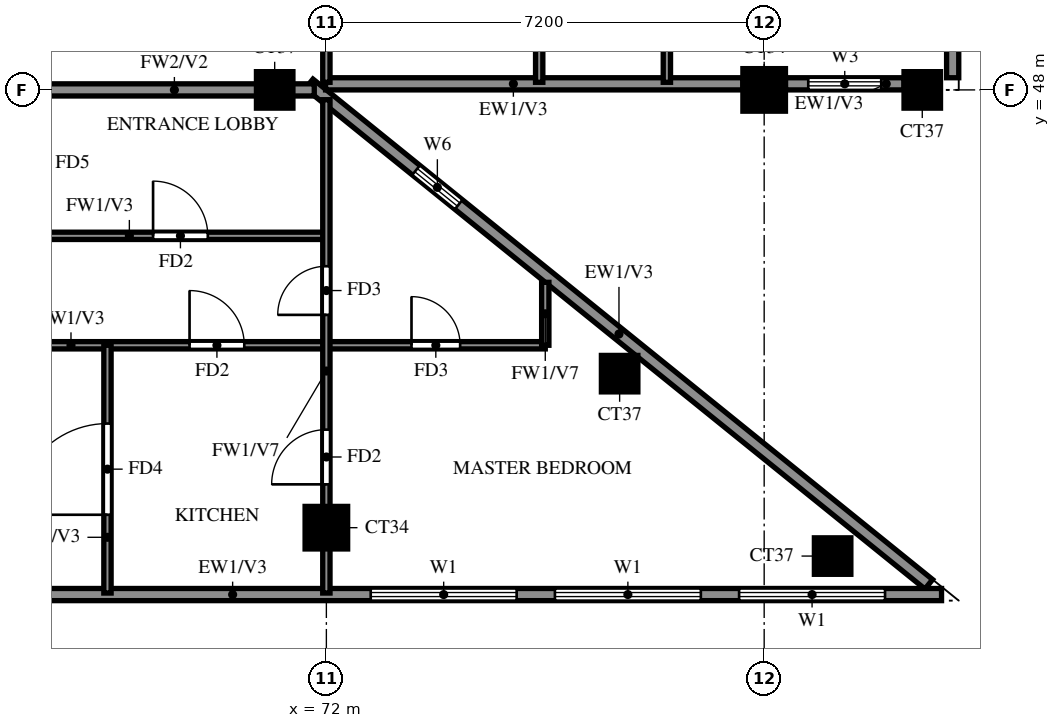
"""IFC4 building model, lengths in metres.
Left out: names, types, materials, properties, quantities, classifications, styles, units other than length and angle.
Written with IfcOpenShell. Run it as: python <this file> out.ifc"""

import sys

from ifc_helpers import new_model, si_unit, direction, frame, frame_2d, origin, origin_2d, place, context, subcontext, project, spatial, rectangle, extrude, source, transform, mapped, element, fill, save


model = new_model("IFC4")
c1 = context("Model", 3, precision=1e-05, world=origin(), true_north=direction((0.0, 1.0)))
c2 = subcontext(c1, "Body", "Model", "MODEL_VIEW")
j1 = project(units=[si_unit("LENGTHUNIT", "METRE"), si_unit("PLANEANGLEUNIT", "RADIAN")], contexts=[c1])
p1 = place(None, origin())
s1 = spatial("IfcSite", under=j1, at=p1, CompositionType="ELEMENT")
p2 = place(p1, origin())
s2 = spatial("IfcBuilding", under=s1, at=p2, CompositionType="ELEMENT")
p3 = place(p2, frame((0.0, 0.0, 260.5)))
s3 = spatial("IfcBuildingStorey", under=s2, at=p3, CompositionType="ELEMENT", Elevation=260.5)
m1 = source(origin(), c2, "Body", "SweptSolid", [
    extrude(rectangle(XDim=0.6, YDim=0.6, at=origin_2d()), origin(), (0.0, 0.0, 1.0), 3.22),
])
p4 = place(p3, frame((80.326, 40.333, 0.0), z_axis=(0.0, 0.0, 1.0), x_axis=(1.0, 0.0, 0.0)))
e1 = element("IfcColumn", 1, at=p4, inside=s3, PredefinedType="COLUMN", context=c2, shape_type="MappedRepresentation", body=[
    mapped(m1, transform((0.0, 0.0, 0.0))),
])
m2 = source(origin(), c2, "Body", "SweptSolid", [
    extrude(rectangle(XDim=0.7, YDim=0.7, at=origin_2d()), origin(), (0.0, 0.0, 1.0), 3.22),
])
p5 = place(p3, frame((72.0, 40.8, 0.0), z_axis=(0.0, 0.0, 1.0), x_axis=(1.0, 0.0, 0.0)))
e2 = element("IfcColumn", 2, at=p5, inside=s3, PredefinedType="COLUMN", context=c2, shape_type="MappedRepresentation", body=[
    mapped(m2, transform((0.0, 0.0, 0.0))),
])
for number, where, z_axis, x_axis in (
    (3, (76.823, 43.333, 0.0), (0.0, 0.0, 1.0), (1.0, 0.0, 0.0)),
    (4, (71.15, 48.0, 0.0), (0.0, 0.0, 1.0), (1.0, 0.0, 0.0)),
):
    element("IfcColumn", number, at=place(p3, frame(where, z_axis=z_axis, x_axis=x_axis)), inside=s3, PredefinedType="COLUMN", context=c2, shape_type="MappedRepresentation", body=[
        mapped(m1, transform((0.0, 0.0, 0.0))),
    ])
p6 = place(p3, frame((79.2, 48.0, 0.0), z_axis=(0.0, 0.0, 1.0), x_axis=(1.0, 0.0, 0.0)))
e5 = element("IfcColumn", 5, at=p6, inside=s3, PredefinedType="COLUMN", context=c2, shape_type="MappedRepresentation", body=[
    mapped(m2, transform((0.0, 0.0, 0.0))),
])
p7 = place(p3, frame((81.8, 48.0, 0.0), z_axis=(0.0, 0.0, 1.0), x_axis=(1.0, 0.0, 0.0)))
e6 = element("IfcColumn", 6, at=p7, inside=s3, PredefinedType="COLUMN", context=c2, shape_type="MappedRepresentation", body=[
    mapped(m1, transform((0.0, 0.0, 0.0))),
])
p8 = place(p3, frame((81.907, 39.87, 0.0), z_axis=(0.0, 0.0, 1.0), x_axis=(-0.777936274417, 0.62834318087, 0.0)))
e7 = element("IfcWall", 7, at=p8, inside=s3, PredefinedType="SOLIDWALL", context=c2, shape_type="SweptSolid", body=[
    extrude(rectangle(XDim=13.099, YDim=0.2, at=frame_2d((6.549, 0.0))), origin(), (0.0, 0.0, 1.0), 3.22),
])
p9 = place(p8, frame((9.938, 0.0, 1.5)))
e8 = element("IfcOpeningElement", 8, at=p9, cuts=e7, PredefinedType="OPENING", context=c2, shape_type="SweptSolid", body=[
    extrude(rectangle(XDim=0.9, YDim=0.9, at=frame_2d((0.45, 0.45))), frame((0.0, 0.11, 0.0), z_axis=(0.0, -1.0, 0.0), x_axis=(1.0, 0.0, 0.0)), (0.0, 0.0, 1.0), 0.22),
])
p10 = place(p3, frame((71.987, 48.1, 0.0), z_axis=(0.0, 0.0, 1.0), x_axis=(1.0, 0.0, 0.0)))
e9 = element("IfcWall", 9, at=p10, inside=s3, PredefinedType="SOLIDWALL", context=c2, shape_type="SweptSolid", body=[
    extrude(rectangle(XDim=6.863, YDim=0.2, at=frame_2d((3.432, 0.0))), origin(), (0.0, 0.0, 1.0), 3.22),
])
p11 = place(p3, frame((79.55, 48.1, 0.0), z_axis=(0.0, 0.0, 1.0), x_axis=(1.0, 0.0, 0.0)))
e10 = element("IfcWall", 10, at=p11, inside=s3, PredefinedType="SOLIDWALL", context=c2, shape_type="SweptSolid", body=[
    extrude(rectangle(XDim=1.95, YDim=0.2, at=frame_2d((0.975, 0.0))), origin(), (0.0, 0.0, 1.0), 3.22),
])
p12 = place(p11, frame((0.375, 0.0, 0.6)))
e11 = element("IfcOpeningElement", 11, at=p12, cuts=e10, PredefinedType="OPENING", context=c2, shape_type="SweptSolid", body=[
    extrude(rectangle(XDim=1.2, YDim=2.4, at=frame_2d((0.6, 1.2))), frame((0.0, 0.11, 0.0), z_axis=(0.0, -1.0, 0.0), x_axis=(1.0, 0.0, 0.0)), (0.0, 0.0, 1.0), 0.22),
])
p13 = place(p3, frame((82.3, 48.2, 0.0), z_axis=(0.0, 0.0, 1.0), x_axis=(0.0, 1.0, 0.0)))
e12 = element("IfcWall", 12, at=p13, inside=s3, PredefinedType="SOLIDWALL", context=c2, shape_type="SweptSolid", body=[
    extrude(rectangle(XDim=28.6, YDim=0.2, at=frame_2d((14.3, 0.0))), origin(), (0.0, 0.0, 1.0), 3.22),
])
p14 = place(p13, frame((7.9, 0.0, 0.0)))
e13 = element("IfcOpeningElement", 13, at=p14, cuts=e12, PredefinedType="OPENING", context=c2, shape_type="SweptSolid", body=[
    extrude(rectangle(XDim=1.8, YDim=2.4, at=frame_2d((0.9, 1.2))), frame((0.0, 0.11, 0.0), z_axis=(0.0, -1.0, 0.0), x_axis=(1.0, 0.0, 0.0)), (0.0, 0.0, 1.0), 0.22),
])
p15 = place(p13, frame((0.6, 0.0, 0.6)))
e14 = element("IfcOpeningElement", 14, at=p15, cuts=e12, PredefinedType="OPENING", context=c2, shape_type="SweptSolid", body=[
    extrude(rectangle(XDim=2.4, YDim=2.4, at=frame_2d((1.2, 1.2))), frame((0.0, 0.11, 0.0), z_axis=(0.0, -1.0, 0.0), x_axis=(1.0, 0.0, 0.0)), (0.0, 0.0, 1.0), 0.22),
])
p16 = place(p13, frame((3.55, 0.0, 0.6)))
e15 = element("IfcOpeningElement", 15, at=p16, cuts=e12, PredefinedType="OPENING", context=c2, shape_type="SweptSolid", body=[
    extrude(rectangle(XDim=0.9, YDim=2.4, at=frame_2d((0.45, 1.2))), frame((0.0, 0.11, 0.0), z_axis=(0.0, -1.0, 0.0), x_axis=(1.0, 0.0, 0.0)), (0.0, 0.0, 1.0), 0.22),
])
p17 = place(p13, frame((5.5, 0.0, 0.6)))
e16 = element("IfcOpeningElement", 16, at=p17, cuts=e12, PredefinedType="OPENING", context=c2, shape_type="SweptSolid", body=[
    extrude(rectangle(XDim=1.2, YDim=2.4, at=frame_2d((0.6, 1.2))), frame((0.0, 0.11, 0.0), z_axis=(0.0, -1.0, 0.0), x_axis=(1.0, 0.0, 0.0)), (0.0, 0.0, 1.0), 0.22),
])
p18 = place(p13, frame((10.15, 0.0, 0.6)))
e17 = element("IfcOpeningElement", 17, at=p18, cuts=e12, PredefinedType="OPENING", context=c2, shape_type="SweptSolid", body=[
    extrude(rectangle(XDim=0.9, YDim=2.4, at=frame_2d((0.45, 1.2))), frame((0.0, 0.11, 0.0), z_axis=(0.0, -1.0, 0.0), x_axis=(1.0, 0.0, 0.0)), (0.0, 0.0, 1.0), 0.22),
])
p19 = place(p13, frame((12.1, 0.0, 0.6)))
e18 = element("IfcOpeningElement", 18, at=p19, cuts=e12, PredefinedType="OPENING", context=c2, shape_type="SweptSolid", body=[
    extrude(rectangle(XDim=1.8, YDim=2.4, at=frame_2d((0.9, 1.2))), frame((0.0, 0.11, 0.0), z_axis=(0.0, -1.0, 0.0), x_axis=(1.0, 0.0, 0.0)), (0.0, 0.0, 1.0), 0.22),
])
p20 = place(p13, frame((14.8, 0.0, 0.6)))
e19 = element("IfcOpeningElement", 19, at=p20, cuts=e12, PredefinedType="OPENING", context=c2, shape_type="SweptSolid", body=[
    extrude(rectangle(XDim=2.4, YDim=2.4, at=frame_2d((1.2, 1.2))), frame((0.0, 0.11, 0.0), z_axis=(0.0, -1.0, 0.0), x_axis=(1.0, 0.0, 0.0)), (0.0, 0.0, 1.0), 0.22),
])
p21 = place(p13, frame((18.4, 0.0, 0.6)))
e20 = element("IfcOpeningElement", 20, at=p21, cuts=e12, PredefinedType="OPENING", context=c2, shape_type="SweptSolid", body=[
    extrude(rectangle(XDim=2.4, YDim=2.4, at=frame_2d((1.2, 1.2))), frame((0.0, 0.11, 0.0), z_axis=(0.0, -1.0, 0.0), x_axis=(1.0, 0.0, 0.0)), (0.0, 0.0, 1.0), 0.22),
])
p22 = place(p13, frame((22.75, 0.0, 1.5)))
e21 = element("IfcOpeningElement", 21, at=p22, cuts=e12, PredefinedType="OPENING", context=c2, shape_type="SweptSolid", body=[
    extrude(rectangle(XDim=0.9, YDim=0.9, at=frame_2d((0.45, 0.45))), frame((0.0, 0.11, 0.0), z_axis=(0.0, -1.0, 0.0), x_axis=(1.0, 0.0, 0.0)), (0.0, 0.0, 1.0), 0.22),
])
p23 = place(p13, frame((25.5, 0.0, 0.6)))
e22 = element("IfcOpeningElement", 22, at=p23, cuts=e12, PredefinedType="OPENING", context=c2, shape_type="SweptSolid", body=[
    extrude(rectangle(XDim=2.4, YDim=2.4, at=frame_2d((1.2, 1.2))), frame((0.0, 0.11, 0.0), z_axis=(0.0, -1.0, 0.0), x_axis=(1.0, 0.0, 0.0)), (0.0, 0.0, 1.0), 0.22),
])
p24 = place(p3, frame((58.8, 39.7, 0.0), z_axis=(0.0, 0.0, 1.0), x_axis=(1.0, 0.0, 0.0)))
e23 = element("IfcWall", 23, at=p24, inside=s3, PredefinedType="SOLIDWALL", context=c2, shape_type="SweptSolid", body=[
    extrude(rectangle(XDim=23.317, YDim=0.2, at=frame_2d((11.658, 0.0))), origin(), (0.0, 0.0, 1.0), 3.22),
])
p25 = place(p24, frame((2.433, 0.0, 0.6)))
e24 = element("IfcOpeningElement", 24, at=p25, cuts=e23, PredefinedType="OPENING", context=c2, shape_type="SweptSolid", body=[
    extrude(rectangle(XDim=2.4, YDim=2.4, at=frame_2d((1.2, 1.2))), frame((0.0, 0.11, 0.0), z_axis=(0.0, -1.0, 0.0), x_axis=(1.0, 0.0, 0.0)), (0.0, 0.0, 1.0), 0.22),
])
p26 = place(p24, frame((5.967, 0.0, 0.6)))
e25 = element("IfcOpeningElement", 25, at=p26, cuts=e23, PredefinedType="OPENING", context=c2, shape_type="SweptSolid", body=[
    extrude(rectangle(XDim=2.4, YDim=2.4, at=frame_2d((1.2, 1.2))), frame((0.0, 0.11, 0.0), z_axis=(0.0, -1.0, 0.0), x_axis=(1.0, 0.0, 0.0)), (0.0, 0.0, 1.0), 0.22),
])
p27 = place(p24, frame((13.929, 0.0, 0.6)))
e26 = element("IfcOpeningElement", 26, at=p27, cuts=e23, PredefinedType="OPENING", context=c2, shape_type="SweptSolid", body=[
    extrude(rectangle(XDim=2.4, YDim=2.4, at=frame_2d((1.2, 1.2))), frame((0.0, 0.11, 0.0), z_axis=(0.0, -1.0, 0.0), x_axis=(1.0, 0.0, 0.0)), (0.0, 0.0, 1.0), 0.22),
])
p28 = place(p24, frame((16.958, 0.0, 0.6)))
e27 = element("IfcOpeningElement", 27, at=p28, cuts=e23, PredefinedType="OPENING", context=c2, shape_type="SweptSolid", body=[
    extrude(rectangle(XDim=2.4, YDim=2.4, at=frame_2d((1.2, 1.2))), frame((0.0, 0.11, 0.0), z_axis=(0.0, -1.0, 0.0), x_axis=(1.0, 0.0, 0.0)), (0.0, 0.0, 1.0), 0.22),
])
p29 = place(p24, frame((19.988, 0.0, 0.6)))
e28 = element("IfcOpeningElement", 28, at=p29, cuts=e23, PredefinedType="OPENING", context=c2, shape_type="SweptSolid", body=[
    extrude(rectangle(XDim=2.4, YDim=2.4, at=frame_2d((1.2, 1.2))), frame((0.0, 0.11, 0.0), z_axis=(0.0, -1.0, 0.0), x_axis=(1.0, 0.0, 0.0)), (0.0, 0.0, 1.0), 0.22),
])
p30 = place(p3, frame((67.2, 48.0, 0.0), z_axis=(0.0, 0.0, 1.0), x_axis=(1.0, 0.0, 0.0)))
e29 = element("IfcWall", 29, at=p30, inside=s3, PredefinedType="SOLIDWALL", context=c2, shape_type="SweptSolid", body=[
    extrude(rectangle(XDim=4.601, YDim=0.2, at=frame_2d((2.301, 0.0))), origin(), (0.0, 0.0, 1.0), 3.22),
])
p31 = place(p3, frame((60.0, 43.8, 0.0), z_axis=(0.0, 0.0, 1.0), x_axis=(1.0, 0.0, 0.0)))
e30 = element("IfcWall", 30, at=p31, inside=s3, PredefinedType="PARTITIONING", context=c2, shape_type="SweptSolid", body=[
    extrude(rectangle(XDim=15.6, YDim=0.12, at=frame_2d((7.8, 0.0))), origin(), (0.0, 0.0, 1.0), 3.22),
])
p32 = place(p31, frame((9.75, 0.0, 0.0)))
e31 = element("IfcOpeningElement", 31, at=p32, cuts=e30, PredefinedType="OPENING", context=c2, shape_type="SweptSolid", body=[
    extrude(rectangle(XDim=0.9, YDim=2.1, at=frame_2d((0.45, 1.05))), frame((0.0, 0.07, 0.0), z_axis=(0.0, -1.0, 0.0), x_axis=(1.0, 0.0, 0.0)), (0.0, 0.0, 1.0), 0.14),
])
p33 = place(p31, frame((3.45, 0.0, 0.0)))
e32 = element("IfcOpeningElement", 32, at=p33, cuts=e30, PredefinedType="OPENING", context=c2, shape_type="SweptSolid", body=[
    extrude(rectangle(XDim=1.5, YDim=2.1, at=frame_2d((0.75, 1.05))), frame((0.0, 0.07, 0.0), z_axis=(0.0, -1.0, 0.0), x_axis=(1.0, 0.0, 0.0)), (0.0, 0.0, 1.0), 0.14),
])
p34 = place(p31, frame((13.4, 0.0, 0.0)))
e33 = element("IfcOpeningElement", 33, at=p34, cuts=e30, PredefinedType="OPENING", context=c2, shape_type="SweptSolid", body=[
    extrude(rectangle(XDim=0.8, YDim=2.1, at=frame_2d((0.4, 1.05))), frame((0.0, 0.07, 0.0), z_axis=(0.0, -1.0, 0.0), x_axis=(1.0, 0.0, 0.0)), (0.0, 0.0, 1.0), 0.14),
])
p35 = place(p3, frame((67.2, 45.6, 0.0), z_axis=(0.0, 0.0, 1.0), x_axis=(1.0, 0.0, 0.0)))
e34 = element("IfcWall", 34, at=p35, inside=s3, PredefinedType="PARTITIONING", context=c2, shape_type="SweptSolid", body=[
    extrude(rectangle(XDim=4.8, YDim=0.12, at=frame_2d((2.4, 0.0))), origin(), (0.0, 0.0, 1.0), 3.22),
])
p36 = place(p35, frame((1.95, 0.0, 0.0)))
e35 = element("IfcOpeningElement", 35, at=p36, cuts=e34, PredefinedType="OPENING", context=c2, shape_type="SweptSolid", body=[
    extrude(rectangle(XDim=0.9, YDim=2.1, at=frame_2d((0.45, 1.05))), frame((0.0, 0.07, 0.0), z_axis=(0.0, -1.0, 0.0), x_axis=(1.0, 0.0, 0.0)), (0.0, 0.0, 1.0), 0.14),
])
p37 = place(p3, frame((68.4, 39.725, 0.0), z_axis=(0.0, 0.0, 1.0), x_axis=(0.0, 1.0, 0.0)))
e36 = element("IfcWall", 36, at=p37, inside=s3, PredefinedType="PARTITIONING", context=c2, shape_type="SweptSolid", body=[
    extrude(rectangle(XDim=4.075, YDim=0.12, at=frame_2d((2.038, 0.0))), origin(), (0.0, 0.0, 1.0), 3.22),
])
p38 = place(p37, frame((1.288, 0.0, 0.0)))
e37 = element("IfcOpeningElement", 37, at=p38, cuts=e36, PredefinedType="OPENING", context=c2, shape_type="SweptSolid", body=[
    extrude(rectangle(XDim=1.5, YDim=2.1, at=frame_2d((0.75, 1.05))), frame((0.0, 0.07, 0.0), z_axis=(0.0, -1.0, 0.0), x_axis=(1.0, 0.0, 0.0)), (0.0, 0.0, 1.0), 0.14),
])
p39 = place(p3, frame((72.0, 39.725, 0.0), z_axis=(0.0, 0.0, 1.0), x_axis=(0.0, 1.0, 0.0)))
e38 = element("IfcWall", 38, at=p39, inside=s3, PredefinedType="PARTITIONING", context=c2, shape_type="SweptSolid", body=[
    extrude(rectangle(XDim=8.114, YDim=0.12, at=frame_2d((4.057, 0.0))), origin(), (0.0, 0.0, 1.0), 2.32),
])
p40 = place(p39, frame((1.788, 0.0, 0.0)))
e39 = element("IfcOpeningElement", 39, at=p40, cuts=e38, PredefinedType="OPENING", context=c2, shape_type="SweptSolid", body=[
    extrude(rectangle(XDim=0.9, YDim=2.1, at=frame_2d((0.45, 1.05))), frame((0.0, 0.07, 0.0), z_axis=(0.0, -1.0, 0.0), x_axis=(1.0, 0.0, 0.0)), (0.0, 0.0, 1.0), 0.14),
])
p41 = place(p39, frame((4.575, 0.0, 0.0)))
e40 = element("IfcOpeningElement", 40, at=p41, cuts=e38, PredefinedType="OPENING", context=c2, shape_type="SweptSolid", body=[
    extrude(rectangle(XDim=0.8, YDim=2.1, at=frame_2d((0.4, 1.05))), frame((0.0, 0.07, 0.0), z_axis=(0.0, -1.0, 0.0), x_axis=(1.0, 0.0, 0.0)), (0.0, 0.0, 1.0), 0.14),
])
p42 = place(p3, frame((72.0, 48.125, 0.0), z_axis=(0.0, 0.0, 1.0), x_axis=(0.0, 1.0, 0.0)))
e41 = element("IfcWall", 41, at=p42, inside=s3, PredefinedType="PARTITIONING", context=c2, shape_type="SweptSolid", body=[
    extrude(rectangle(XDim=7.075, YDim=0.12, at=frame_2d((3.538, 0.0))), origin(), (0.0, 0.0, 1.0), 3.22),
])
p43 = place(p3, frame((75.5, 48.125, 0.0), z_axis=(0.0, 0.0, 1.0), x_axis=(0.0, 1.0, 0.0)))
e42 = element("IfcWall", 42, at=p43, inside=s3, PredefinedType="PARTITIONING", context=c2, shape_type="SweptSolid", body=[
    extrude(rectangle(XDim=7.075, YDim=0.12, at=frame_2d((3.538, 0.0))), origin(), (0.0, 0.0, 1.0), 3.22),
])
p44 = place(p43, frame((3.087, 0.0, 0.0)))
e43 = element("IfcOpeningElement", 43, at=p44, cuts=e42, PredefinedType="OPENING", context=c2, shape_type="SweptSolid", body=[
    extrude(rectangle(XDim=0.9, YDim=2.1, at=frame_2d((0.45, 1.05))), frame((0.0, 0.07, 0.0), z_axis=(0.0, -1.0, 0.0), x_axis=(1.0, 0.0, 0.0)), (0.0, 0.0, 1.0), 0.14),
])
p45 = place(p3, frame((75.6, 43.8, 0.0), z_axis=(0.0, 0.0, 1.0), x_axis=(0.0, 1.0, 0.0)))
e44 = element("IfcWall", 44, at=p45, inside=s3, PredefinedType="PARTITIONING", context=c2, shape_type="SweptSolid", body=[
    extrude(rectangle(XDim=1.035, YDim=0.12, at=frame_2d((0.518, 0.0))), origin(), (0.0, 0.0, 1.0), 2.32),
])
p46 = place(p3, frame((77.6, 48.125, 0.0), z_axis=(0.0, 0.0, 1.0), x_axis=(0.0, 1.0, 0.0)))
e45 = element("IfcWall", 45, at=p46, inside=s3, PredefinedType="PARTITIONING", context=c2, shape_type="SweptSolid", body=[
    extrude(rectangle(XDim=21.475, YDim=0.12, at=frame_2d((10.738, 0.0))), origin(), (0.0, 0.0, 1.0), 3.22),
])
p47 = place(p46, frame((1.288, 0.0, 0.0)))
e46 = element("IfcOpeningElement", 46, at=p47, cuts=e45, PredefinedType="OPENING", context=c2, shape_type="SweptSolid", body=[
    extrude(rectangle(XDim=0.9, YDim=2.1, at=frame_2d((0.45, 1.05))), frame((0.0, 0.07, 0.0), z_axis=(0.0, -1.0, 0.0), x_axis=(1.0, 0.0, 0.0)), (0.0, 0.0, 1.0), 0.14),
])
p48 = place(p46, frame((4.825, 0.0, 0.0)))
e47 = element("IfcOpeningElement", 47, at=p48, cuts=e45, PredefinedType="OPENING", context=c2, shape_type="SweptSolid", body=[
    extrude(rectangle(XDim=0.9, YDim=2.1, at=frame_2d((0.45, 1.05))), frame((0.0, 0.07, 0.0), z_axis=(0.0, -1.0, 0.0), x_axis=(1.0, 0.0, 0.0)), (0.0, 0.0, 1.0), 0.14),
])
p49 = place(p46, frame((9.925, 0.0, 0.0)))
e48 = element("IfcOpeningElement", 48, at=p49, cuts=e45, PredefinedType="OPENING", context=c2, shape_type="SweptSolid", body=[
    extrude(rectangle(XDim=1.5, YDim=2.1, at=frame_2d((0.75, 1.05))), frame((0.0, 0.07, 0.0), z_axis=(0.0, -1.0, 0.0), x_axis=(1.0, 0.0, 0.0)), (0.0, 0.0, 1.0), 0.14),
])
p50 = place(p46, frame((15.625, 0.0, 0.0)))
e49 = element("IfcOpeningElement", 49, at=p50, cuts=e45, PredefinedType="OPENING", context=c2, shape_type="SweptSolid", body=[
    extrude(rectangle(XDim=0.9, YDim=2.1, at=frame_2d((0.45, 1.05))), frame((0.0, 0.07, 0.0), z_axis=(0.0, -1.0, 0.0), x_axis=(1.0, 0.0, 0.0)), (0.0, 0.0, 1.0), 0.14),
])
p51 = place(p46, frame((19.225, 0.0, 0.0)))
e50 = element("IfcOpeningElement", 50, at=p51, cuts=e45, PredefinedType="OPENING", context=c2, shape_type="SweptSolid", body=[
    extrude(rectangle(XDim=0.9, YDim=2.1, at=frame_2d((0.45, 1.05))), frame((0.0, 0.07, 0.0), z_axis=(0.0, -1.0, 0.0), x_axis=(1.0, 0.0, 0.0)), (0.0, 0.0, 1.0), 0.14),
])
p52 = place(p9, origin())
e51 = element("IfcWindow", 51, at=p52, inside=s3, PartitioningType="SINGLE_PANEL", PredefinedType="WINDOW", context=c2, shape_type="SweptSolid", body=[
    extrude(rectangle(XDim=0.9, YDim=0.9, at=frame_2d((0.45, 0.45))), frame((0.0, 0.03, 0.0), z_axis=(0.0, -1.0, 0.0), x_axis=(1.0, 0.0, 0.0)), (0.0, 0.0, 1.0), 0.06),
])
fill(e8, e51)
p53 = place(p12, origin())
e52 = element("IfcWindow", 52, at=p53, inside=s3, PartitioningType="SINGLE_PANEL", PredefinedType="WINDOW", context=c2, shape_type="SweptSolid", body=[
    extrude(rectangle(XDim=1.2, YDim=2.4, at=frame_2d((0.6, 1.2))), frame((0.0, 0.03, 0.0), z_axis=(0.0, -1.0, 0.0), x_axis=(1.0, 0.0, 0.0)), (0.0, 0.0, 1.0), 0.06),
])
fill(e11, e52)
p54 = place(p27, origin())
e53 = element("IfcWindow", 53, at=p54, inside=s3, PartitioningType="DOUBLE_PANEL_VERTICAL", PredefinedType="WINDOW", context=c2, shape_type="SweptSolid", body=[
    extrude(rectangle(XDim=2.4, YDim=2.4, at=frame_2d((1.2, 1.2))), frame((0.0, 0.03, 0.0), z_axis=(0.0, -1.0, 0.0), x_axis=(1.0, 0.0, 0.0)), (0.0, 0.0, 1.0), 0.06),
])
fill(e26, e53)
p55 = place(p28, origin())
e54 = element("IfcWindow", 54, at=p55, inside=s3, PartitioningType="DOUBLE_PANEL_VERTICAL", PredefinedType="WINDOW", context=c2, shape_type="SweptSolid", body=[
    extrude(rectangle(XDim=2.4, YDim=2.4, at=frame_2d((1.2, 1.2))), frame((0.0, 0.03, 0.0), z_axis=(0.0, -1.0, 0.0), x_axis=(1.0, 0.0, 0.0)), (0.0, 0.0, 1.0), 0.06),
])
fill(e27, e54)
p56 = place(p29, origin())
e55 = element("IfcWindow", 55, at=p56, inside=s3, PartitioningType="DOUBLE_PANEL_VERTICAL", PredefinedType="WINDOW", context=c2, shape_type="SweptSolid", body=[
    extrude(rectangle(XDim=2.4, YDim=2.4, at=frame_2d((1.2, 1.2))), frame((0.0, 0.03, 0.0), z_axis=(0.0, -1.0, 0.0), x_axis=(1.0, 0.0, 0.0)), (0.0, 0.0, 1.0), 0.06),
])
fill(e28, e55)
p57 = place(p38, origin())
e56 = element("IfcDoor", 56, at=p57, inside=s3, OperationType="SINGLE_SWING_LEFT", PredefinedType="DOOR", context=c2, shape_type="SweptSolid", body=[
    extrude(rectangle(XDim=1.5, YDim=2.1, at=frame_2d((0.75, 1.05))), frame((0.0, 0.025, 0.0), z_axis=(0.0, -1.0, 0.0), x_axis=(1.0, 0.0, 0.0)), (0.0, 0.0, 1.0), 0.05),
])
fill(e37, e56)
p58 = place(p36, origin())
e57 = element("IfcDoor", 57, at=p58, inside=s3, OperationType="SINGLE_SWING_LEFT", PredefinedType="DOOR", context=c2, shape_type="SweptSolid", body=[
    extrude(rectangle(XDim=0.9, YDim=2.1, at=frame_2d((0.45, 1.05))), frame((0.0, 0.025, 0.0), z_axis=(0.0, -1.0, 0.0), x_axis=(1.0, 0.0, 0.0)), (0.0, 0.0, 1.0), 0.05),
])
fill(e35, e57)
p59 = place(p32, origin())
e58 = element("IfcDoor", 58, at=p59, inside=s3, OperationType="SINGLE_SWING_LEFT", PredefinedType="DOOR", context=c2, shape_type="SweptSolid", body=[
    extrude(rectangle(XDim=0.9, YDim=2.1, at=frame_2d((0.45, 1.05))), frame((0.0, 0.025, 0.0), z_axis=(0.0, -1.0, 0.0), x_axis=(1.0, 0.0, 0.0)), (0.0, 0.0, 1.0), 0.05),
])
fill(e31, e58)
p60 = place(p40, origin())
e59 = element("IfcDoor", 59, at=p60, inside=s3, OperationType="SINGLE_SWING_LEFT", PredefinedType="DOOR", context=c2, shape_type="SweptSolid", body=[
    extrude(rectangle(XDim=0.9, YDim=2.1, at=frame_2d((0.45, 1.05))), frame((0.0, 0.025, 0.0), z_axis=(0.0, -1.0, 0.0), x_axis=(1.0, 0.0, 0.0)), (0.0, 0.0, 1.0), 0.05),
])
fill(e39, e59)
p61 = place(p41, origin())
e60 = element("IfcDoor", 60, at=p61, inside=s3, OperationType="SINGLE_SWING_LEFT", PredefinedType="DOOR", context=c2, shape_type="SweptSolid", body=[
    extrude(rectangle(XDim=0.8, YDim=2.1, at=frame_2d((0.4, 1.05))), frame((0.0, 0.025, 0.0), z_axis=(0.0, -1.0, 0.0), x_axis=(1.0, 0.0, 0.0)), (0.0, 0.0, 1.0), 0.05),
])
fill(e40, e60)
p62 = place(p34, origin())
e61 = element("IfcDoor", 61, at=p62, inside=s3, OperationType="SINGLE_SWING_LEFT", PredefinedType="DOOR", context=c2, shape_type="SweptSolid", body=[
    extrude(rectangle(XDim=0.8, YDim=2.1, at=frame_2d((0.4, 1.05))), frame((0.0, 0.025, 0.0), z_axis=(0.0, -1.0, 0.0), x_axis=(1.0, 0.0, 0.0)), (0.0, 0.0, 1.0), 0.05),
])
fill(e33, e61)
save(model, sys.argv[1])
